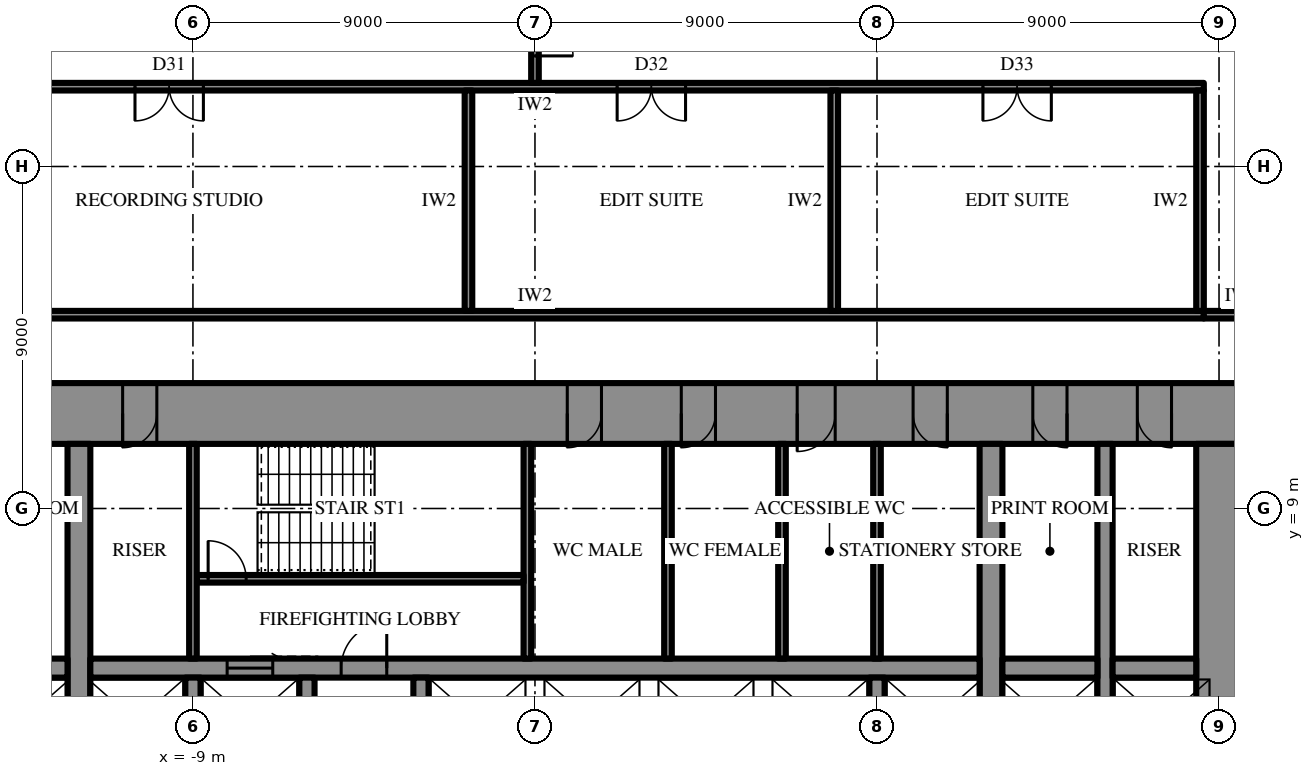
"""IFC4 building model, lengths in metres.
Left out: names, types, materials, properties, quantities, classifications, styles, units other than length and angle.
Written with IfcOpenShell. Run it as: python <this file> out.ifc"""

import sys

from ifc_helpers import new_model, si_unit, direction, frame, frame_2d, origin, place, context, subcontext, project, spatial, rectangle, extrude, element, fill, save


model = new_model("IFC4")
c1 = context("Model", 3, precision=1e-05, world=origin(), true_north=direction((0.0, 1.0)))
c2 = subcontext(c1, "Body", "Model", "MODEL_VIEW")
j1 = project(units=[si_unit("LENGTHUNIT", "METRE"), si_unit("PLANEANGLEUNIT", "RADIAN")], contexts=[c1])
p1 = place(None, origin())
s1 = spatial("IfcSite", under=j1, at=p1, CompositionType="ELEMENT")
p2 = place(p1, origin())
s2 = spatial("IfcBuilding", under=s1, at=p2, CompositionType="ELEMENT")
p3 = place(p2, frame((0.0, 0.0, 103.3)))
s3 = spatial("IfcBuildingStorey", under=s2, at=p3, CompositionType="ELEMENT", Elevation=103.3)
p4 = place(p3, frame((-18.6, 11.5, 0.0), z_axis=(0.0, 0.0, 1.0), x_axis=(1.0, 0.0, 0.0)))
e1 = element("IfcWall", 1, at=p4, inside=s3, PredefinedType="SHEAR", context=c2, shape_type="SweptSolid", body=[
    extrude(rectangle(XDim=37.2, YDim=1.6, at=frame_2d((18.6, 0.0))), origin(), (0.0, 0.0, 1.0), 4.2),
])
p5 = place(p4, frame((19.45, 0.0, 0.0)))
e2 = element("IfcOpeningElement", 2, at=p5, cuts=e1, PredefinedType="OPENING", context=c2, shape_type="SweptSolid", body=[
    extrude(rectangle(XDim=0.9, YDim=2.2, at=frame_2d((0.45, 1.1))), frame((0.0, 0.81, 0.0), z_axis=(0.0, -1.0, 0.0), x_axis=(1.0, 0.0, 0.0)), (0.0, 0.0, 1.0), 1.62),
])
p6 = place(p4, frame((22.45, 0.0, 0.0)))
e3 = element("IfcOpeningElement", 3, at=p6, cuts=e1, PredefinedType="OPENING", context=c2, shape_type="SweptSolid", body=[
    extrude(rectangle(XDim=0.9, YDim=2.2, at=frame_2d((0.45, 1.1))), frame((0.0, 0.81, 0.0), z_axis=(0.0, -1.0, 0.0), x_axis=(1.0, 0.0, 0.0)), (0.0, 0.0, 1.0), 1.62),
])
p7 = place(p4, frame((25.5, 0.0, 0.0)))
e4 = element("IfcOpeningElement", 4, at=p7, cuts=e1, PredefinedType="OPENING", context=c2, shape_type="SweptSolid", body=[
    extrude(rectangle(XDim=1.0, YDim=2.2, at=frame_2d((0.5, 1.1))), frame((0.0, 0.81, 0.0), z_axis=(0.0, -1.0, 0.0), x_axis=(1.0, 0.0, 0.0)), (0.0, 0.0, 1.0), 1.62),
])
p8 = place(p4, frame((1.85, 0.0, 0.0)))
e5 = element("IfcOpeningElement", 5, at=p8, cuts=e1, PredefinedType="OPENING", context=c2, shape_type="SweptSolid", body=[
    extrude(rectangle(XDim=0.9, YDim=2.2, at=frame_2d((0.45, 1.1))), frame((0.0, 0.81, 0.0), z_axis=(0.0, -1.0, 0.0), x_axis=(1.0, 0.0, 0.0)), (0.0, 0.0, 1.0), 1.62),
])
p9 = place(p4, frame((4.6, 0.0, 0.0)))
e6 = element("IfcOpeningElement", 6, at=p9, cuts=e1, PredefinedType="OPENING", context=c2, shape_type="SweptSolid", body=[
    extrude(rectangle(XDim=0.9, YDim=2.2, at=frame_2d((0.45, 1.1))), frame((0.0, 0.81, 0.0), z_axis=(0.0, -1.0, 0.0), x_axis=(1.0, 0.0, 0.0)), (0.0, 0.0, 1.0), 1.62),
])
p10 = place(p4, frame((7.75, 0.0, 0.0)))
e7 = element("IfcOpeningElement", 7, at=p10, cuts=e1, PredefinedType="OPENING", context=c2, shape_type="SweptSolid", body=[
    extrude(rectangle(XDim=0.9, YDim=2.2, at=frame_2d((0.45, 1.1))), frame((0.0, 0.81, 0.0), z_axis=(0.0, -1.0, 0.0), x_axis=(1.0, 0.0, 0.0)), (0.0, 0.0, 1.0), 1.62),
])
p11 = place(p4, frame((28.55, 0.0, 0.0)))
e8 = element("IfcOpeningElement", 8, at=p11, cuts=e1, PredefinedType="OPENING", context=c2, shape_type="SweptSolid", body=[
    extrude(rectangle(XDim=0.9, YDim=2.2, at=frame_2d((0.45, 1.1))), frame((0.0, 0.81, 0.0), z_axis=(0.0, -1.0, 0.0), x_axis=(1.0, 0.0, 0.0)), (0.0, 0.0, 1.0), 1.62),
])
p12 = place(p4, frame((31.7, 0.0, 0.0)))
e9 = element("IfcOpeningElement", 9, at=p12, cuts=e1, PredefinedType="OPENING", context=c2, shape_type="SweptSolid", body=[
    extrude(rectangle(XDim=0.9, YDim=2.2, at=frame_2d((0.45, 1.1))), frame((0.0, 0.81, 0.0), z_axis=(0.0, -1.0, 0.0), x_axis=(1.0, 0.0, 0.0)), (0.0, 0.0, 1.0), 1.62),
])
p13 = place(p4, frame((34.45, 0.0, 0.0)))
e10 = element("IfcOpeningElement", 10, at=p13, cuts=e1, PredefinedType="OPENING", context=c2, shape_type="SweptSolid", body=[
    extrude(rectangle(XDim=0.9, YDim=2.2, at=frame_2d((0.45, 1.1))), frame((0.0, 0.81, 0.0), z_axis=(0.0, -1.0, 0.0), x_axis=(1.0, 0.0, 0.0)), (0.0, 0.0, 1.0), 1.62),
])
p14 = place(p3, frame((18.0, -10.7, 0.0), z_axis=(0.0, 0.0, 1.0), x_axis=(0.0, 1.0, 0.0)))
e11 = element("IfcWall", 11, at=p14, inside=s3, PredefinedType="SHEAR", context=c2, shape_type="SweptSolid", body=[
    extrude(rectangle(XDim=21.4, YDim=1.2, at=frame_2d((10.7, 0.0))), origin(), (0.0, 0.0, 1.0), 4.2),
])
p15 = place(p14, frame((9.8, 0.0, 0.0)))
e12 = element("IfcOpeningElement", 12, at=p15, cuts=e11, PredefinedType="OPENING", context=c2, shape_type="SweptSolid", body=[
    extrude(rectangle(XDim=1.8, YDim=2.4, at=frame_2d((0.9, 1.2))), frame((0.0, 0.61, 0.0), z_axis=(0.0, -1.0, 0.0), x_axis=(1.0, 0.0, 0.0)), (0.0, 0.0, 1.0), 1.22),
])
p16 = place(p3, frame((12.0, -10.7, 0.0), z_axis=(0.0, 0.0, 1.0), x_axis=(0.0, 1.0, 0.0)))
e13 = element("IfcWall", 13, at=p16, inside=s3, PredefinedType="SHEAR", context=c2, shape_type="SweptSolid", body=[
    extrude(rectangle(XDim=21.4, YDim=0.6, at=frame_2d((10.7, 0.0))), origin(), (0.0, 0.0, 1.0), 4.2),
])
p17 = place(p16, frame((9.8, 0.0, 0.0)))
e14 = element("IfcOpeningElement", 14, at=p17, cuts=e13, PredefinedType="OPENING", context=c2, shape_type="SweptSolid", body=[
    extrude(rectangle(XDim=1.8, YDim=2.4, at=frame_2d((0.9, 1.2))), frame((0.0, 0.31, 0.0), z_axis=(0.0, -1.0, 0.0), x_axis=(1.0, 0.0, 0.0)), (0.0, 0.0, 1.0), 0.62),
])
p18 = place(p3, frame((-12.0, -10.7, 0.0), z_axis=(0.0, 0.0, 1.0), x_axis=(0.0, 1.0, 0.0)))
e15 = element("IfcWall", 15, at=p18, inside=s3, PredefinedType="SHEAR", context=c2, shape_type="SweptSolid", body=[
    extrude(rectangle(XDim=21.4, YDim=0.6, at=frame_2d((10.7, 0.0))), origin(), (0.0, 0.0, 1.0), 4.2),
])
p19 = place(p18, frame((9.8, 0.0, 0.0)))
e16 = element("IfcOpeningElement", 16, at=p19, cuts=e15, PredefinedType="OPENING", context=c2, shape_type="SweptSolid", body=[
    extrude(rectangle(XDim=1.8, YDim=2.4, at=frame_2d((0.9, 1.2))), frame((0.0, 0.31, 0.0), z_axis=(0.0, -1.0, 0.0), x_axis=(1.0, 0.0, 0.0)), (0.0, 0.0, 1.0), 0.62),
])
p20 = place(p3, frame((15.0, -10.7, 0.0), z_axis=(0.0, 0.0, 1.0), x_axis=(0.0, 1.0, 0.0)))
e17 = element("IfcWall", 17, at=p20, inside=s3, PredefinedType="SHEAR", context=c2, shape_type="SweptSolid", body=[
    extrude(rectangle(XDim=21.4, YDim=0.4, at=frame_2d((10.7, 0.0))), origin(), (0.0, 0.0, 1.0), 4.2),
])
p21 = place(p20, frame((9.8, 0.0, 0.0)))
e18 = element("IfcOpeningElement", 18, at=p21, cuts=e17, PredefinedType="OPENING", context=c2, shape_type="SweptSolid", body=[
    extrude(rectangle(XDim=1.8, YDim=2.4, at=frame_2d((0.9, 1.2))), frame((0.0, 0.21, 0.0), z_axis=(0.0, -1.0, 0.0), x_axis=(1.0, 0.0, 0.0)), (0.0, 0.0, 1.0), 0.42),
])
p22 = place(p3, frame((-14.8, 4.8, 0.0), z_axis=(0.0, 0.0, 1.0), x_axis=(1.0, 0.0, 0.0)))
e19 = element("IfcWall", 19, at=p22, inside=s3, PredefinedType="SHEAR", context=c2, shape_type="SweptSolid", body=[
    extrude(rectangle(XDim=2.5, YDim=0.5, at=frame_2d((1.25, 0.0))), origin(), (0.0, 0.0, 1.0), 4.2),
])
p23 = place(p3, frame((-11.7, 4.8, 0.0), z_axis=(0.0, 0.0, 1.0), x_axis=(1.0, 0.0, 0.0)))
e20 = element("IfcWall", 20, at=p23, inside=s3, PredefinedType="SHEAR", context=c2, shape_type="SweptSolid", body=[
    extrude(rectangle(XDim=23.4, YDim=0.5, at=frame_2d((11.7, 0.0))), origin(), (0.0, 0.0, 1.0), 4.2),
])
p24 = place(p23, frame((6.6, 0.0, 0.0)))
e21 = element("IfcOpeningElement", 21, at=p24, cuts=e20, PredefinedType="OPENING", context=c2, shape_type="SweptSolid", body=[
    extrude(rectangle(XDim=1.2, YDim=2.2, at=frame_2d((0.6, 1.1))), frame((0.0, 0.26, 0.0), z_axis=(0.0, -1.0, 0.0), x_axis=(1.0, 0.0, 0.0)), (0.0, 0.0, 1.0), 0.52),
])
p25 = place(p23, frame((3.6, 0.0, 0.0)))
e22 = element("IfcOpeningElement", 22, at=p25, cuts=e20, PredefinedType="OPENING", context=c2, shape_type="SweptSolid", body=[
    extrude(rectangle(XDim=1.2, YDim=2.2, at=frame_2d((0.6, 1.1))), frame((0.0, 0.26, 0.0), z_axis=(0.0, -1.0, 0.0), x_axis=(1.0, 0.0, 0.0)), (0.0, 0.0, 1.0), 0.52),
])
p26 = place(p3, frame((12.3, 4.8, 0.0), z_axis=(0.0, 0.0, 1.0), x_axis=(1.0, 0.0, 0.0)))
e23 = element("IfcWall", 23, at=p26, inside=s3, PredefinedType="SHEAR", context=c2, shape_type="SweptSolid", body=[
    extrude(rectangle(XDim=2.5, YDim=0.5, at=frame_2d((1.25, 0.0))), origin(), (0.0, 0.0, 1.0), 4.2),
])
p27 = place(p3, frame((15.2, 4.8, 0.0), z_axis=(0.0, 0.0, 1.0), x_axis=(1.0, 0.0, 0.0)))
e24 = element("IfcWall", 24, at=p27, inside=s3, PredefinedType="SHEAR", context=c2, shape_type="SweptSolid", body=[
    extrude(rectangle(XDim=2.2, YDim=0.5, at=frame_2d((1.1, 0.0))), origin(), (0.0, 0.0, 1.0), 4.2),
])
for number, where, z_axis, x_axis in (
    (25, (-9.0, 2.25, 0.0), (0.0, 0.0, 1.0), (0.0, 1.0, 0.0)),
    (26, (-6.0, 2.25, 0.0), (0.0, 0.0, 1.0), (0.0, 1.0, 0.0)),
    (27, (-3.0, 2.25, 0.0), (0.0, 0.0, 1.0), (0.0, 1.0, 0.0)),
    (28, (9.0, 2.25, 0.0), (0.0, 0.0, 1.0), (0.0, 1.0, 0.0)),
):
    element("IfcWall", number, at=place(p3, frame(where, z_axis=z_axis, x_axis=x_axis)), inside=s3, PredefinedType="SHEAR", context=c2, shape_type="SweptSolid", body=[
        extrude(rectangle(XDim=2.3, YDim=0.4, at=frame_2d((1.15, 0.0))), origin(), (0.0, 0.0, 1.0), 4.2),
    ])
p28 = place(p3, frame((-0.2, 5.05, 0.0), z_axis=(0.0, 0.0, 1.0), x_axis=(0.0, 1.0, 0.0)))
e29 = element("IfcWall", 29, at=p28, inside=s3, PredefinedType="SHEAR", context=c2, shape_type="SweptSolid", body=[
    extrude(rectangle(XDim=5.65, YDim=0.2, at=frame_2d((2.825, 0.0))), origin(), (0.0, 0.0, 1.0), 4.2),
])
p29 = place(p3, frame((-8.9, 7.15, 0.0), z_axis=(0.0, 0.0, 1.0), x_axis=(1.0, 0.0, 0.0)))
e30 = element("IfcWall", 30, at=p29, inside=s3, PredefinedType="SHEAR", context=c2, shape_type="SweptSolid", body=[
    extrude(rectangle(XDim=8.6, YDim=0.2, at=frame_2d((4.3, 0.0))), origin(), (0.0, 0.0, 1.0), 4.2),
])
p30 = place(p29, frame((0.3, 0.0, 0.0)))
e31 = element("IfcOpeningElement", 31, at=p30, cuts=e30, PredefinedType="OPENING", context=c2, shape_type="SweptSolid", body=[
    extrude(rectangle(XDim=1.0, YDim=2.2, at=frame_2d((0.5, 1.1))), frame((0.0, 0.11, 0.0), z_axis=(0.0, -1.0, 0.0), x_axis=(1.0, 0.0, 0.0)), (0.0, 0.0, 1.0), 0.22),
])
for number, where, z_axis, x_axis in (
    (32, (-9.0, 5.05, 0.0), (0.0, 0.0, 1.0), (0.0, 1.0, 0.0)),
    (33, (9.0, 5.05, 0.0), (0.0, 0.0, 1.0), (0.0, 1.0, 0.0)),
    (34, (3.5, 5.05, 0.0), (0.0, 0.0, 1.0), (0.0, 1.0, 0.0)),
    (35, (6.5, 5.05, 0.0), (0.0, 0.0, 1.0), (0.0, 1.0, 0.0)),
):
    element("IfcWall", number, at=place(p3, frame(where, z_axis=z_axis, x_axis=x_axis)), inside=s3, PredefinedType="PARTITIONING", context=c2, shape_type="SweptSolid", body=[
        extrude(rectangle(XDim=5.65, YDim=0.2, at=frame_2d((2.825, 0.0))), origin(), (0.0, 0.0, 1.0), 3.9),
    ])
p31 = place(p3, frame((-17.6, 14.1, 0.0), z_axis=(0.0, 0.0, 1.0), x_axis=(1.0, 0.0, 0.0)))
e36 = element("IfcWall", 36, at=p31, inside=s3, PredefinedType="PARTITIONING", context=c2, shape_type="SweptSolid", body=[
    extrude(rectangle(XDim=35.2, YDim=0.2, at=frame_2d((17.6, 0.0))), origin(), (0.0, 0.0, 1.0), 3.9),
])
p32 = place(p3, frame((-17.6, 20.1, 0.0), z_axis=(0.0, 0.0, 1.0), x_axis=(1.0, 0.0, 0.0)))
e37 = element("IfcWall", 37, at=p32, inside=s3, PredefinedType="PARTITIONING", context=c2, shape_type="SweptSolid", body=[
    extrude(rectangle(XDim=35.2, YDim=0.2, at=frame_2d((17.6, 0.0))), origin(), (0.0, 0.0, 1.0), 3.9),
])
p33 = place(p32, frame((7.075, 0.0, 0.0)))
e38 = element("IfcOpeningElement", 38, at=p33, cuts=e37, PredefinedType="OPENING", context=c2, shape_type="SweptSolid", body=[
    extrude(rectangle(XDim=1.8, YDim=2.4, at=frame_2d((0.9, 1.2))), frame((0.0, 0.11, 0.0), z_axis=(0.0, -1.0, 0.0), x_axis=(1.0, 0.0, 0.0)), (0.0, 0.0, 1.0), 0.22),
])
p34 = place(p32, frame((19.762, 0.0, 0.0)))
e39 = element("IfcOpeningElement", 39, at=p34, cuts=e37, PredefinedType="OPENING", context=c2, shape_type="SweptSolid", body=[
    extrude(rectangle(XDim=1.8, YDim=2.4, at=frame_2d((0.9, 1.2))), frame((0.0, 0.11, 0.0), z_axis=(0.0, -1.0, 0.0), x_axis=(1.0, 0.0, 0.0)), (0.0, 0.0, 1.0), 0.22),
])
p35 = place(p32, frame((29.387, 0.0, 0.0)))
e40 = element("IfcOpeningElement", 40, at=p35, cuts=e37, PredefinedType="OPENING", context=c2, shape_type="SweptSolid", body=[
    extrude(rectangle(XDim=1.8, YDim=2.4, at=frame_2d((0.9, 1.2))), frame((0.0, 0.11, 0.0), z_axis=(0.0, -1.0, 0.0), x_axis=(1.0, 0.0, 0.0)), (0.0, 0.0, 1.0), 0.22),
])
for number, where, z_axis, x_axis in (
    (41, (-1.75, 14.2, 0.0), (0.0, 0.0, 1.0), (0.0, 1.0, 0.0)),
    (42, (7.875, 14.2, 0.0), (0.0, 0.0, 1.0), (0.0, 1.0, 0.0)),
    (43, (17.5, 14.2, 0.0), (0.0, 0.0, 1.0), (0.0, 1.0, 0.0)),
):
    element("IfcWall", number, at=place(p3, frame(where, z_axis=z_axis, x_axis=x_axis)), inside=s3, PredefinedType="PARTITIONING", context=c2, shape_type="SweptSolid", body=[
        extrude(rectangle(XDim=5.8, YDim=0.2, at=frame_2d((2.9, 0.0))), origin(), (0.0, 0.0, 1.0), 3.9),
    ])
p36 = place(p3, frame((17.6, 14.1, 0.0), z_axis=(0.0, 0.0, 1.0), x_axis=(1.0, 0.0, 0.0)))
e44 = element("IfcWall", 44, at=p36, inside=s3, PredefinedType="PARTITIONING", context=c2, shape_type="SweptSolid", body=[
    extrude(rectangle(XDim=2.0, YDim=0.2, at=frame_2d((1.0, 0.0))), origin(), (0.0, 0.0, 1.0), 3.9),
])
p37 = place(p3, frame((0.0, 20.2, 0.0), z_axis=(0.0, 0.0, 1.0), x_axis=(0.0, 1.0, 0.0)))
e45 = element("IfcWall", 45, at=p37, inside=s3, PredefinedType="PARTITIONING", context=c2, shape_type="SweptSolid", body=[
    extrude(rectangle(XDim=12.1, YDim=0.2, at=frame_2d((6.05, 0.0))), origin(), (0.0, 0.0, 1.0), 2.844),
])
p38 = place(p37, frame((0.71, 0.0, 0.0)))
e46 = element("IfcOpeningElement", 46, at=p38, cuts=e45, PredefinedType="OPENING", context=c2, shape_type="SweptSolid", body=[
    extrude(rectangle(XDim=1.0, YDim=2.2, at=frame_2d((0.5, 1.1))), frame((0.0, 0.11, 0.0), z_axis=(0.0, -1.0, 0.0), x_axis=(1.0, 0.0, 0.0)), (0.0, 0.0, 1.0), 0.22),
])
p39 = place(p24, origin())
e47 = element("IfcDoor", 47, at=p39, inside=s3, OperationType="SINGLE_SWING_LEFT", PredefinedType="DOOR", context=c2, shape_type="SweptSolid", body=[
    extrude(rectangle(XDim=1.2, YDim=2.2, at=frame_2d((0.6, 1.1))), frame((0.0, 0.025, 0.0), z_axis=(0.0, -1.0, 0.0), x_axis=(1.0, 0.0, 0.0)), (0.0, 0.0, 1.0), 0.05),
])
fill(e21, e47)
p40 = place(p30, origin())
e48 = element("IfcDoor", 48, at=p40, inside=s3, OperationType="SINGLE_SWING_RIGHT", PredefinedType="DOOR", context=c2, shape_type="SweptSolid", body=[
    extrude(rectangle(XDim=1.0, YDim=2.2, at=frame_2d((0.5, 1.1))), frame((0.0, 0.025, 0.0), z_axis=(0.0, -1.0, 0.0), x_axis=(1.0, 0.0, 0.0)), (0.0, 0.0, 1.0), 0.05),
])
fill(e31, e48)
p41 = place(p5, frame((0.9, 0.0, 0.0), z_axis=(0.0, 0.0, 1.0), x_axis=(-1.0, 0.0, 0.0)))
e49 = element("IfcDoor", 49, at=p41, inside=s3, OperationType="SINGLE_SWING_LEFT", PredefinedType="DOOR", context=c2, shape_type="SweptSolid", body=[
    extrude(rectangle(XDim=0.9, YDim=2.2, at=frame_2d((0.45, 1.1))), frame((0.0, 0.025, 0.0), z_axis=(0.0, -1.0, 0.0), x_axis=(1.0, 0.0, 0.0)), (0.0, 0.0, 1.0), 0.05),
])
fill(e2, e49)
p42 = place(p6, frame((0.9, 0.0, 0.0), z_axis=(0.0, 0.0, 1.0), x_axis=(-1.0, 0.0, 0.0)))
e50 = element("IfcDoor", 50, at=p42, inside=s3, OperationType="SINGLE_SWING_LEFT", PredefinedType="DOOR", context=c2, shape_type="SweptSolid", body=[
    extrude(rectangle(XDim=0.9, YDim=2.2, at=frame_2d((0.45, 1.1))), frame((0.0, 0.025, 0.0), z_axis=(0.0, -1.0, 0.0), x_axis=(1.0, 0.0, 0.0)), (0.0, 0.0, 1.0), 0.05),
])
fill(e3, e50)
p43 = place(p7, frame((1.0, 0.0, 0.0), z_axis=(0.0, 0.0, 1.0), x_axis=(-1.0, 0.0, 0.0)))
e51 = element("IfcDoor", 51, at=p43, inside=s3, OperationType="SINGLE_SWING_LEFT", PredefinedType="DOOR", context=c2, shape_type="SweptSolid", body=[
    extrude(rectangle(XDim=1.0, YDim=2.2, at=frame_2d((0.5, 1.1))), frame((0.0, 0.025, 0.0), z_axis=(0.0, -1.0, 0.0), x_axis=(1.0, 0.0, 0.0)), (0.0, 0.0, 1.0), 0.05),
])
fill(e4, e51)
p44 = place(p10, frame((0.9, 0.0, 0.0), z_axis=(0.0, 0.0, 1.0), x_axis=(-1.0, 0.0, 0.0)))
e52 = element("IfcDoor", 52, at=p44, inside=s3, OperationType="SINGLE_SWING_LEFT", PredefinedType="DOOR", context=c2, shape_type="SweptSolid", body=[
    extrude(rectangle(XDim=0.9, YDim=2.2, at=frame_2d((0.45, 1.1))), frame((0.0, 0.025, 0.0), z_axis=(0.0, -1.0, 0.0), x_axis=(1.0, 0.0, 0.0)), (0.0, 0.0, 1.0), 0.05),
])
fill(e7, e52)
p45 = place(p11, frame((0.9, 0.0, 0.0), z_axis=(0.0, 0.0, 1.0), x_axis=(-1.0, 0.0, 0.0)))
e53 = element("IfcDoor", 53, at=p45, inside=s3, OperationType="SINGLE_SWING_RIGHT", PredefinedType="DOOR", context=c2, shape_type="SweptSolid", body=[
    extrude(rectangle(XDim=0.9, YDim=2.2, at=frame_2d((0.45, 1.1))), frame((0.0, 0.025, 0.0), z_axis=(0.0, -1.0, 0.0), x_axis=(1.0, 0.0, 0.0)), (0.0, 0.0, 1.0), 0.05),
])
fill(e8, e53)
p46 = place(p12, frame((0.9, 0.0, 0.0), z_axis=(0.0, 0.0, 1.0), x_axis=(-1.0, 0.0, 0.0)))
e54 = element("IfcDoor", 54, at=p46, inside=s3, OperationType="SINGLE_SWING_RIGHT", PredefinedType="DOOR", context=c2, shape_type="SweptSolid", body=[
    extrude(rectangle(XDim=0.9, YDim=2.2, at=frame_2d((0.45, 1.1))), frame((0.0, 0.025, 0.0), z_axis=(0.0, -1.0, 0.0), x_axis=(1.0, 0.0, 0.0)), (0.0, 0.0, 1.0), 0.05),
])
fill(e9, e54)
p47 = place(p13, frame((0.9, 0.0, 0.0), z_axis=(0.0, 0.0, 1.0), x_axis=(-1.0, 0.0, 0.0)))
e55 = element("IfcDoor", 55, at=p47, inside=s3, OperationType="SINGLE_SWING_RIGHT", PredefinedType="DOOR", context=c2, shape_type="SweptSolid", body=[
    extrude(rectangle(XDim=0.9, YDim=2.2, at=frame_2d((0.45, 1.1))), frame((0.0, 0.025, 0.0), z_axis=(0.0, -1.0, 0.0), x_axis=(1.0, 0.0, 0.0)), (0.0, 0.0, 1.0), 0.05),
])
fill(e10, e55)
p48 = place(p25, origin())
e56 = element("IfcDoor", 56, at=p48, inside=s3, OperationType="SLIDING_TO_LEFT", PredefinedType="DOOR", context=c2, shape_type="SweptSolid", body=[
    extrude(rectangle(XDim=1.2, YDim=2.2, at=frame_2d((0.6, 1.1))), frame((0.0, 0.025, 0.0), z_axis=(0.0, -1.0, 0.0), x_axis=(1.0, 0.0, 0.0)), (0.0, 0.0, 1.0), 0.05),
])
fill(e22, e56)
p49 = place(p33, frame((1.8, 0.0, 0.0), z_axis=(0.0, 0.0, 1.0), x_axis=(-1.0, 0.0, 0.0)))
e57 = element("IfcDoor", 57, at=p49, inside=s3, OperationType="DOUBLE_DOOR_SINGLE_SWING", PredefinedType="DOOR", context=c2, shape_type="SweptSolid", body=[
    extrude(rectangle(XDim=1.8, YDim=2.4, at=frame_2d((0.9, 1.2))), frame((0.0, 0.025, 0.0), z_axis=(0.0, -1.0, 0.0), x_axis=(1.0, 0.0, 0.0)), (0.0, 0.0, 1.0), 0.05),
])
fill(e38, e57)
p50 = place(p34, frame((1.8, 0.0, 0.0), z_axis=(0.0, 0.0, 1.0), x_axis=(-1.0, 0.0, 0.0)))
e58 = element("IfcDoor", 58, at=p50, inside=s3, OperationType="DOUBLE_DOOR_SINGLE_SWING", PredefinedType="DOOR", context=c2, shape_type="SweptSolid", body=[
    extrude(rectangle(XDim=1.8, YDim=2.4, at=frame_2d((0.9, 1.2))), frame((0.0, 0.025, 0.0), z_axis=(0.0, -1.0, 0.0), x_axis=(1.0, 0.0, 0.0)), (0.0, 0.0, 1.0), 0.05),
])
fill(e39, e58)
p51 = place(p35, frame((1.8, 0.0, 0.0), z_axis=(0.0, 0.0, 1.0), x_axis=(-1.0, 0.0, 0.0)))
e59 = element("IfcDoor", 59, at=p51, inside=s3, OperationType="DOUBLE_DOOR_SINGLE_SWING", PredefinedType="DOOR", context=c2, shape_type="SweptSolid", body=[
    extrude(rectangle(XDim=1.8, YDim=2.4, at=frame_2d((0.9, 1.2))), frame((0.0, 0.025, 0.0), z_axis=(0.0, -1.0, 0.0), x_axis=(1.0, 0.0, 0.0)), (0.0, 0.0, 1.0), 0.05),
])
fill(e40, e59)
p52 = place(p38, frame((1.0, 0.0, 0.0), z_axis=(0.0, 0.0, 1.0), x_axis=(-1.0, 0.0, 0.0)))
e60 = element("IfcDoor", 60, at=p52, inside=s3, OperationType="SINGLE_SWING_LEFT", PredefinedType="DOOR", context=c2, shape_type="SweptSolid", body=[
    extrude(rectangle(XDim=1.0, YDim=2.2, at=frame_2d((0.5, 1.1))), frame((0.0, 0.025, 0.0), z_axis=(0.0, -1.0, 0.0), x_axis=(1.0, 0.0, 0.0)), (0.0, 0.0, 1.0), 0.05),
])
fill(e46, e60)
save(model, sys.argv[1])
